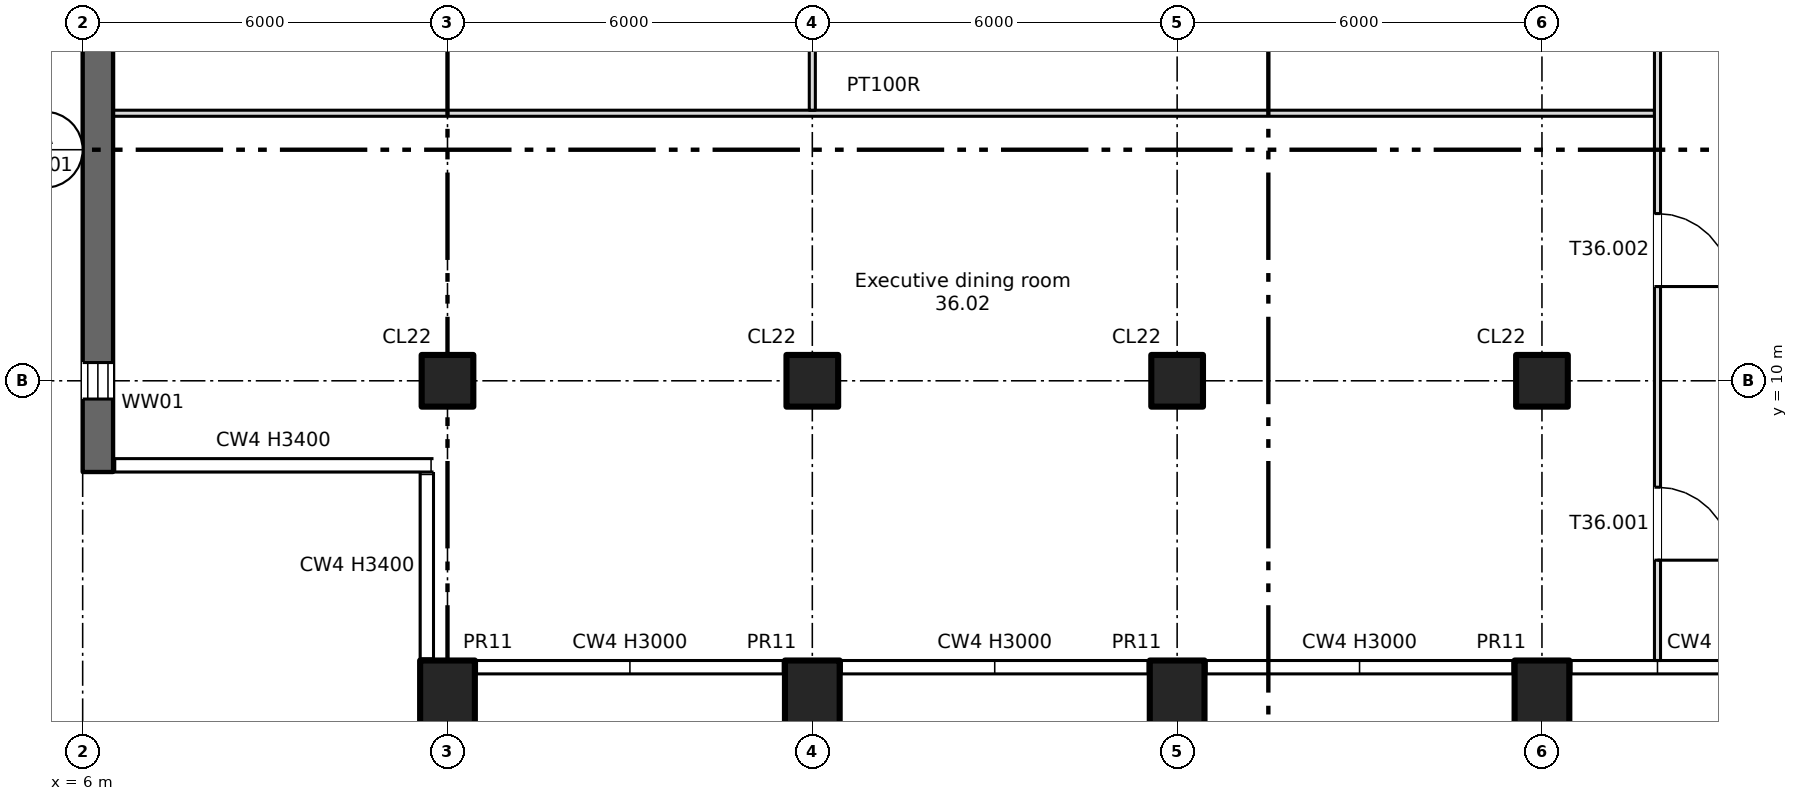
"""IFC4 building model, lengths in metres.
Left out: names, types, materials, properties, quantities, classifications, styles, units other than length and angle.
Written with IfcOpenShell. Run it as: python <this file> out.ifc"""

import sys

from ifc_helpers import new_model, si_unit, direction, frame, frame_2d, origin, origin_2d, place, context, subcontext, project, spatial, rectangle, extrude, element, fill, save


model = new_model("IFC4")
c1 = context("Model", 3, precision=1e-05, world=origin(), true_north=direction((0.0, 1.0)))
c2 = subcontext(c1, "Body", "Model", "MODEL_VIEW")
j1 = project(units=[si_unit("LENGTHUNIT", "METRE"), si_unit("PLANEANGLEUNIT", "RADIAN")], contexts=[c1])
p1 = place(None, origin())
s1 = spatial("IfcSite", under=j1, at=p1, CompositionType="ELEMENT")
p2 = place(p1, origin())
s2 = spatial("IfcBuilding", under=s1, at=p2, CompositionType="ELEMENT")
p3 = place(p2, frame((0.0, 0.0, 250.75)))
s3 = spatial("IfcBuildingStorey", under=s2, at=p3, CompositionType="ELEMENT", Elevation=250.75)
for number, where, z_axis, x_axis in (
    (1, (12.0, 4.7, -0.4), (0.0, 0.0, 1.0), (1.0, 0.0, 0.0)),
    (2, (18.0, 4.7, -0.4), (0.0, 0.0, 1.0), (1.0, 0.0, 0.0)),
    (3, (24.0, 4.7, -0.4), (0.0, 0.0, 1.0), (1.0, 0.0, 0.0)),
    (4, (30.0, 4.7, -0.4), (0.0, 0.0, 1.0), (1.0, 0.0, 0.0)),
):
    element("IfcColumn", number, at=place(p3, frame(where, z_axis=z_axis, x_axis=x_axis)), inside=s3, PredefinedType="COLUMN", context=c2, shape_type="SweptSolid", body=[
        extrude(rectangle(XDim=0.9, YDim=1.4, at=origin_2d()), origin(), (0.0, 0.0, 1.0), 3.8),
    ])
for number, where, z_axis, x_axis in (
    (5, (12.0, 10.0, 0.0), (0.0, 0.0, 1.0), (1.0, 0.0, 0.0)),
    (6, (18.0, 10.0, 0.0), (0.0, 0.0, 1.0), (1.0, 0.0, 0.0)),
    (7, (24.0, 10.0, 0.0), (0.0, 0.0, 1.0), (1.0, 0.0, 0.0)),
    (8, (30.0, 10.0, 0.0), (0.0, 0.0, 1.0), (1.0, 0.0, 0.0)),
):
    element("IfcColumn", number, at=place(p3, frame(where, z_axis=z_axis, x_axis=x_axis)), inside=s3, PredefinedType="COLUMN", context=c2, shape_type="SweptSolid", body=[
        extrude(rectangle(XDim=0.85, YDim=0.85, at=origin_2d()), origin(), (0.0, 0.0, 1.0), 3.4),
    ])
p4 = place(p3, frame((6.25, 8.5, 0.0), z_axis=(0.0, 0.0, 1.0), x_axis=(0.0, 1.0, 0.0)))
e9 = element("IfcWall", 9, at=p4, inside=s3, PredefinedType="SHEAR", context=c2, shape_type="SweptSolid", body=[
    extrude(rectangle(XDim=33.0, YDim=0.5, at=frame_2d((16.5, 0.0))), origin(), (0.0, 0.0, 1.0), 3.4),
])
p5 = place(p4, frame((1.2, 0.0, 0.6)))
e10 = element("IfcOpeningElement", 10, at=p5, cuts=e9, PredefinedType="OPENING", context=c2, shape_type="SweptSolid", body=[
    extrude(rectangle(XDim=0.6, YDim=2.4, at=frame_2d((0.3, 1.2))), frame((0.0, 0.26, 0.0), z_axis=(0.0, -1.0, 0.0), x_axis=(1.0, 0.0, 0.0)), (0.0, 0.0, 1.0), 0.52),
])
p6 = place(p4, frame((7.2, 0.0, 0.6)))
e11 = element("IfcOpeningElement", 11, at=p6, cuts=e9, PredefinedType="OPENING", context=c2, shape_type="SweptSolid", body=[
    extrude(rectangle(XDim=0.6, YDim=2.4, at=frame_2d((0.3, 1.2))), frame((0.0, 0.26, 0.0), z_axis=(0.0, -1.0, 0.0), x_axis=(1.0, 0.0, 0.0)), (0.0, 0.0, 1.0), 0.52),
])
p7 = place(p4, frame((13.2, 0.0, 0.6)))
e12 = element("IfcOpeningElement", 12, at=p7, cuts=e9, PredefinedType="OPENING", context=c2, shape_type="SweptSolid", body=[
    extrude(rectangle(XDim=0.6, YDim=2.4, at=frame_2d((0.3, 1.2))), frame((0.0, 0.26, 0.0), z_axis=(0.0, -1.0, 0.0), x_axis=(1.0, 0.0, 0.0)), (0.0, 0.0, 1.0), 0.52),
])
p8 = place(p3, frame((6.5, 14.4, 0.0), z_axis=(0.0, 0.0, 1.0), x_axis=(1.0, 0.0, 0.0)))
e13 = element("IfcWall", 13, at=p8, inside=s3, PredefinedType="PARTITIONING", context=c2, shape_type="SweptSolid", body=[
    extrude(rectangle(XDim=25.35, YDim=0.1, at=frame_2d((12.675, 0.0))), origin(), (0.0, 0.0, 1.0), 3.4),
])
p9 = place(p3, frame((18.0, 14.45, 0.0), z_axis=(0.0, 0.0, 1.0), x_axis=(0.0, 1.0, 0.0)))
e14 = element("IfcWall", 14, at=p9, inside=s3, PredefinedType="PARTITIONING", context=c2, shape_type="SweptSolid", body=[
    extrude(rectangle(XDim=4.125, YDim=0.1, at=frame_2d((2.062, 0.0))), origin(), (0.0, 0.0, 1.0), 3.4),
])
p10 = place(p3, frame((31.9, 5.4, 0.0), z_axis=(0.0, 0.0, 1.0), x_axis=(0.0, 1.0, 0.0)))
e15 = element("IfcWall", 15, at=p10, inside=s3, PredefinedType="PARTITIONING", context=c2, shape_type="SweptSolid", body=[
    extrude(rectangle(XDim=20.55, YDim=0.1, at=frame_2d((10.275, 0.0))), origin(), (0.0, 0.0, 1.0), 3.4),
])
p11 = place(p10, frame((1.65, 0.0, 0.0)))
e16 = element("IfcOpeningElement", 16, at=p11, cuts=e15, PredefinedType="OPENING", context=c2, shape_type="SweptSolid", body=[
    extrude(rectangle(XDim=1.2, YDim=2.1, at=frame_2d((0.6, 1.05))), frame((0.0, 0.06, 0.0), z_axis=(0.0, -1.0, 0.0), x_axis=(1.0, 0.0, 0.0)), (0.0, 0.0, 1.0), 0.12),
])
p12 = place(p10, frame((6.15, 0.0, 0.0)))
e17 = element("IfcOpeningElement", 17, at=p12, cuts=e15, PredefinedType="OPENING", context=c2, shape_type="SweptSolid", body=[
    extrude(rectangle(XDim=1.2, YDim=2.1, at=frame_2d((0.6, 1.05))), frame((0.0, 0.06, 0.0), z_axis=(0.0, -1.0, 0.0), x_axis=(1.0, 0.0, 0.0)), (0.0, 0.0, 1.0), 0.12),
])
p13 = place(p5, origin())
e18 = element("IfcWindow", 18, at=p13, inside=s3, PartitioningType="SINGLE_PANEL", PredefinedType="WINDOW", context=c2, shape_type="SweptSolid", body=[
    extrude(rectangle(XDim=0.6, YDim=2.4, at=frame_2d((0.3, 1.2))), frame((0.0, 0.03, 0.0), z_axis=(0.0, -1.0, 0.0), x_axis=(1.0, 0.0, 0.0)), (0.0, 0.0, 1.0), 0.06),
])
fill(e10, e18)
p14 = place(p11, origin())
e19 = element("IfcDoor", 19, at=p14, inside=s3, OperationType="SINGLE_SWING_LEFT", PredefinedType="DOOR", context=c2, shape_type="SweptSolid", body=[
    extrude(rectangle(XDim=1.2, YDim=2.1, at=frame_2d((0.6, 1.05))), frame((0.0, 0.025, 0.0), z_axis=(0.0, -1.0, 0.0), x_axis=(1.0, 0.0, 0.0)), (0.0, 0.0, 1.0), 0.05),
])
fill(e16, e19)
p15 = place(p12, origin())
e20 = element("IfcDoor", 20, at=p15, inside=s3, OperationType="SINGLE_SWING_LEFT", PredefinedType="DOOR", context=c2, shape_type="SweptSolid", body=[
    extrude(rectangle(XDim=1.2, YDim=2.1, at=frame_2d((0.6, 1.05))), frame((0.0, 0.025, 0.0), z_axis=(0.0, -1.0, 0.0), x_axis=(1.0, 0.0, 0.0)), (0.0, 0.0, 1.0), 0.05),
])
fill(e17, e20)
save(model, sys.argv[1])
